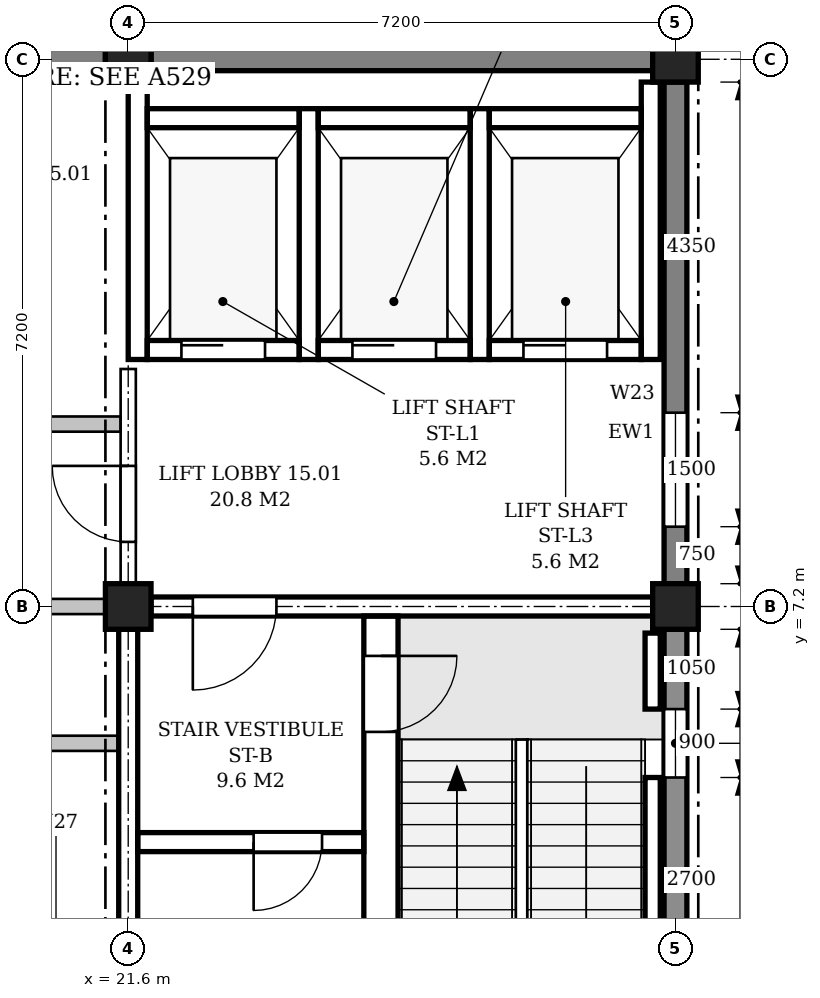
"""IFC4 building model, lengths in metres.
Left out: names, types, materials, properties, quantities, classifications, styles, units other than length and angle.
Written with IfcOpenShell. Run it as: python <this file> out.ifc"""

import sys

from ifc_helpers import new_model, si_unit, direction, frame, frame_2d, origin, origin_2d, place, context, subcontext, project, spatial, polyline, rectangle, outline, extrude, element, fill, save


model = new_model("IFC4")
c1 = context("Model", 3, precision=1e-05, world=origin(), true_north=direction((0.0, 1.0)))
c2 = subcontext(c1, "Body", "Model", "MODEL_VIEW")
j1 = project(units=[si_unit("LENGTHUNIT", "METRE"), si_unit("PLANEANGLEUNIT", "RADIAN")], contexts=[c1])
p1 = place(None, origin())
s1 = spatial("IfcSite", under=j1, at=p1, CompositionType="ELEMENT")
p2 = place(p1, origin())
s2 = spatial("IfcBuilding", under=s1, at=p2, CompositionType="ELEMENT")
p3 = place(p2, frame((0.0, 0.0, 72.3)))
s3 = spatial("IfcBuildingStorey", under=s2, at=p3, CompositionType="ELEMENT", Elevation=72.3)
for number, where, z_axis, x_axis in (
    (1, (21.6, 7.2, 0.0), (0.0, 0.0, 1.0), (1.0, 0.0, 0.0)),
    (2, (21.6, 14.4, 0.0), (0.0, 0.0, 1.0), (1.0, 0.0, 0.0)),
    (3, (28.8, 7.2, 0.0), (0.0, 0.0, 1.0), (1.0, 0.0, 0.0)),
    (4, (28.8, 14.4, 0.0), (0.0, 0.0, 1.0), (1.0, 0.0, 0.0)),
):
    element("IfcColumn", number, at=place(p3, frame(where, z_axis=z_axis, x_axis=x_axis)), inside=s3, PredefinedType="COLUMN", context=c2, shape_type="SweptSolid", body=[
        extrude(rectangle(XDim=0.6, YDim=0.6, at=origin_2d()), origin(), (0.0, 0.0, 1.0), 4.5),
    ])
p4 = place(p3, frame((28.8, 0.3, 0.0), z_axis=(0.0, 0.0, 1.0), x_axis=(0.0, 1.0, 0.0)))
e5 = element("IfcWall", 5, at=p4, inside=s3, PredefinedType="STANDARD", context=c2, shape_type="SweptSolid", body=[
    extrude(rectangle(XDim=6.6, YDim=0.3, at=frame_2d((3.3, 0.0))), origin(), (0.0, 0.0, 1.0), 3.65),
])
p5 = place(p4, frame((1.05, 0.0, 0.9)))
e6 = element("IfcOpeningElement", 6, at=p5, cuts=e5, PredefinedType="OPENING", context=c2, shape_type="SweptSolid", body=[
    extrude(outline(polyline([(0.0, 0.0), (0.9, 0.0), (0.9, 2.25), (0.45, 2.7), (0.0, 2.25), (0.0, 0.0)])), frame((0.0, 0.16, 0.0), z_axis=(0.0, -1.0, 0.0), x_axis=(1.0, 0.0, 0.0)), (0.0, 0.0, 1.0), 0.32),
])
p6 = place(p4, frame((4.65, 0.0, 0.9)))
e7 = element("IfcOpeningElement", 7, at=p6, cuts=e5, PredefinedType="OPENING", context=c2, shape_type="SweptSolid", body=[
    extrude(outline(polyline([(0.0, 0.0), (0.9, 0.0), (0.9, 2.25), (0.45, 2.7), (0.0, 2.25), (0.0, 0.0)])), frame((0.0, 0.16, 0.0), z_axis=(0.0, -1.0, 0.0), x_axis=(1.0, 0.0, 0.0)), (0.0, 0.0, 1.0), 0.32),
])
p7 = place(p3, frame((28.8, 7.5, 0.0), z_axis=(0.0, 0.0, 1.0), x_axis=(0.0, 1.0, 0.0)))
e8 = element("IfcWall", 8, at=p7, inside=s3, PredefinedType="STANDARD", context=c2, shape_type="SweptSolid", body=[
    extrude(rectangle(XDim=6.6, YDim=0.3, at=frame_2d((3.3, 0.0))), origin(), (0.0, 0.0, 1.0), 3.65),
])
p8 = place(p7, frame((0.75, 0.0, 0.9)))
e9 = element("IfcOpeningElement", 9, at=p8, cuts=e8, PredefinedType="OPENING", context=c2, shape_type="SweptSolid", body=[
    extrude(outline(polyline([(0.0, 0.0), (1.5, 0.0), (1.5, 1.95), (0.75, 2.7), (0.0, 1.95), (0.0, 0.0)])), frame((0.0, 0.16, 0.0), z_axis=(0.0, -1.0, 0.0), x_axis=(1.0, 0.0, 0.0)), (0.0, 0.0, 1.0), 0.32),
])
p9 = place(p3, frame((28.5, 14.4, 0.0), z_axis=(0.0, 0.0, 1.0), x_axis=(-1.0, 0.0, 0.0)))
e10 = element("IfcWall", 10, at=p9, inside=s3, PredefinedType="STANDARD", context=c2, shape_type="SweptSolid", body=[
    extrude(rectangle(XDim=6.6, YDim=0.3, at=frame_2d((3.3, 0.0))), origin(), (0.0, 0.0, 1.0), 3.65),
])
p10 = place(p3, frame((21.3, 14.4, 0.0), z_axis=(0.0, 0.0, 1.0), x_axis=(-1.0, 0.0, 0.0)))
e11 = element("IfcWall", 11, at=p10, inside=s3, PredefinedType="STANDARD", context=c2, shape_type="SweptSolid", body=[
    extrude(rectangle(XDim=6.6, YDim=0.3, at=frame_2d((3.3, 0.0))), origin(), (0.0, 0.0, 1.0), 3.65),
])
p11 = place(p10, frame((0.75, 0.0, 0.9)))
e12 = element("IfcOpeningElement", 12, at=p11, cuts=e11, PredefinedType="OPENING", context=c2, shape_type="SweptSolid", body=[
    extrude(outline(polyline([(0.0, 0.0), (1.5, 0.0), (1.5, 1.95), (0.75, 2.7), (0.0, 1.95), (0.0, 0.0)])), frame((0.0, 0.16, 0.0), z_axis=(0.0, -1.0, 0.0), x_axis=(1.0, 0.0, 0.0)), (0.0, 0.0, 1.0), 0.32),
])
p12 = place(p10, frame((4.35, 0.0, 0.9)))
e13 = element("IfcOpeningElement", 13, at=p12, cuts=e11, PredefinedType="OPENING", context=c2, shape_type="SweptSolid", body=[
    extrude(outline(polyline([(0.0, 0.0), (1.5, 0.0), (1.5, 1.95), (0.75, 2.7), (0.0, 1.95), (0.0, 0.0)])), frame((0.0, 0.16, 0.0), z_axis=(0.0, -1.0, 0.0), x_axis=(1.0, 0.0, 0.0)), (0.0, 0.0, 1.0), 0.32),
])
p13 = place(p3, frame((21.9, 7.2, 0.0), z_axis=(0.0, 0.0, 1.0), x_axis=(1.0, 0.0, 0.0)))
e14 = element("IfcWall", 14, at=p13, inside=s3, PredefinedType="SHEAR", context=c2, shape_type="SweptSolid", body=[
    extrude(rectangle(XDim=6.6, YDim=0.25, at=frame_2d((3.3, 0.0))), origin(), (0.0, 0.0, 1.0), 3.6),
])
p14 = place(p13, frame((0.55, 0.0, 0.0)))
e15 = element("IfcOpeningElement", 15, at=p14, cuts=e14, PredefinedType="OPENING", context=c2, shape_type="SweptSolid", body=[
    extrude(rectangle(XDim=1.1, YDim=2.1, at=frame_2d((0.55, 1.05))), frame((0.0, 0.135, 0.0), z_axis=(0.0, -1.0, 0.0), x_axis=(1.0, 0.0, 0.0)), (0.0, 0.0, 1.0), 0.27),
])
p15 = place(p3, frame((21.6, 0.3, 0.0), z_axis=(0.0, 0.0, 1.0), x_axis=(0.0, 1.0, 0.0)))
e16 = element("IfcWall", 16, at=p15, inside=s3, PredefinedType="SHEAR", context=c2, shape_type="SweptSolid", body=[
    extrude(rectangle(XDim=6.6, YDim=0.25, at=frame_2d((3.3, 0.0))), origin(), (0.0, 0.0, 1.0), 3.6),
])
p16 = place(p3, frame((28.5, 2.25, -0.25), z_axis=(0.0, 0.0, 1.0), x_axis=(0.0, 1.0, 0.0)))
e17 = element("IfcWall", 17, at=p16, inside=s3, PredefinedType="SHEAR", context=c2, shape_type="SweptSolid", body=[
    extrude(rectangle(XDim=2.7, YDim=0.2, at=frame_2d((1.35, 0.0))), origin(), (0.0, 0.0, 1.0), 4.5),
])
p17 = place(p3, frame((28.5, 5.85, -0.25), z_axis=(0.0, 0.0, 1.0), x_axis=(0.0, 1.0, 0.0)))
e18 = element("IfcWall", 18, at=p17, inside=s3, PredefinedType="SHEAR", context=c2, shape_type="SweptSolid", body=[
    extrude(rectangle(XDim=1.0, YDim=0.2, at=frame_2d((0.5, 0.0))), origin(), (0.0, 0.0, 1.0), 4.5),
])
p18 = place(p3, frame((24.925, 0.15, 0.0), z_axis=(0.0, 0.0, 1.0), x_axis=(0.0, 1.0, 0.0)))
e19 = element("IfcWall", 19, at=p18, inside=s3, PredefinedType="SHEAR", context=c2, shape_type="SweptSolid", body=[
    extrude(rectangle(XDim=6.925, YDim=0.45, at=frame_2d((3.462, 0.0))), origin(), (0.0, 0.0, 1.0), 4.25),
])
p19 = place(p18, frame((5.4, 0.0, 0.0)))
e20 = element("IfcOpeningElement", 20, at=p19, cuts=e19, PredefinedType="OPENING", context=c2, shape_type="SweptSolid", body=[
    extrude(rectangle(XDim=1.0, YDim=2.1, at=frame_2d((0.5, 1.05))), frame((0.0, 0.235, 0.0), z_axis=(0.0, -1.0, 0.0), x_axis=(1.0, 0.0, 0.0)), (0.0, 0.0, 1.0), 0.47),
])
p20 = place(p3, frame((21.725, 4.1, 0.0), z_axis=(0.0, 0.0, 1.0), x_axis=(1.0, 0.0, 0.0)))
e21 = element("IfcWall", 21, at=p20, inside=s3, PredefinedType="SHEAR", context=c2, shape_type="SweptSolid", body=[
    extrude(rectangle(XDim=2.975, YDim=0.25, at=frame_2d((1.487, 0.0))), origin(), (0.0, 0.0, 1.0), 4.25),
])
p21 = place(p20, frame((1.525, 0.0, 0.0)))
e22 = element("IfcOpeningElement", 22, at=p21, cuts=e21, PredefinedType="OPENING", context=c2, shape_type="SweptSolid", body=[
    extrude(rectangle(XDim=0.9, YDim=2.1, at=frame_2d((0.45, 1.05))), frame((0.0, 0.135, 0.0), z_axis=(0.0, -1.0, 0.0), x_axis=(1.0, 0.0, 0.0)), (0.0, 0.0, 1.0), 0.27),
])
p22 = place(p3, frame((21.725, 10.45, -0.25), z_axis=(0.0, 0.0, 1.0), x_axis=(0.0, 1.0, 0.0)))
e23 = element("IfcWall", 23, at=p22, inside=s3, PredefinedType="SHEAR", context=c2, shape_type="SweptSolid", body=[
    extrude(rectangle(XDim=3.65, YDim=0.25, at=frame_2d((1.825, 0.0))), origin(), (0.0, 0.0, 1.0), 3.85),
])
for number, where, z_axis, x_axis in (
    (24, (23.975, 10.45, -0.25), (0.0, 0.0, 1.0), (0.0, 1.0, 0.0)),
    (25, (26.225, 10.45, -0.25), (0.0, 0.0, 1.0), (0.0, 1.0, 0.0)),
):
    element("IfcWall", number, at=place(p3, frame(where, z_axis=z_axis, x_axis=x_axis)), inside=s3, PredefinedType="SHEAR", context=c2, shape_type="SweptSolid", body=[
        extrude(rectangle(XDim=3.3, YDim=0.25, at=frame_2d((1.65, 0.0))), origin(), (0.0, 0.0, 1.0), 4.5),
    ])
p23 = place(p3, frame((28.475, 10.45, -0.25), z_axis=(0.0, 0.0, 1.0), x_axis=(0.0, 1.0, 0.0)))
e26 = element("IfcWall", 26, at=p23, inside=s3, PredefinedType="SHEAR", context=c2, shape_type="SweptSolid", body=[
    extrude(rectangle(XDim=3.65, YDim=0.25, at=frame_2d((1.825, 0.0))), origin(), (0.0, 0.0, 1.0), 4.5),
])
p24 = place(p3, frame((21.85, 10.575, -0.25), z_axis=(0.0, 0.0, 1.0), x_axis=(1.0, 0.0, 0.0)))
e27 = element("IfcWall", 27, at=p24, inside=s3, PredefinedType="SHEAR", context=c2, shape_type="SweptSolid", body=[
    extrude(rectangle(XDim=2.0, YDim=0.25, at=frame_2d((1.0, 0.0))), origin(), (0.0, 0.0, 1.0), 4.5),
])
p25 = place(p24, frame((0.45, 0.0, 0.25)))
e28 = element("IfcOpeningElement", 28, at=p25, cuts=e27, PredefinedType="OPENING", context=c2, shape_type="SweptSolid", body=[
    extrude(rectangle(XDim=1.1, YDim=2.1, at=frame_2d((0.55, 1.05))), frame((0.0, 0.135, 0.0), z_axis=(0.0, -1.0, 0.0), x_axis=(1.0, 0.0, 0.0)), (0.0, 0.0, 1.0), 0.27),
])
p26 = place(p3, frame((21.85, 13.625, -0.25), z_axis=(0.0, 0.0, 1.0), x_axis=(1.0, 0.0, 0.0)))
e29 = element("IfcWall", 29, at=p26, inside=s3, PredefinedType="SHEAR", context=c2, shape_type="SweptSolid", body=[
    extrude(rectangle(XDim=2.0, YDim=0.25, at=frame_2d((1.0, 0.0))), origin(), (0.0, 0.0, 1.0), 4.5),
])
p27 = place(p3, frame((24.1, 10.575, -0.25), z_axis=(0.0, 0.0, 1.0), x_axis=(1.0, 0.0, 0.0)))
e30 = element("IfcWall", 30, at=p27, inside=s3, PredefinedType="SHEAR", context=c2, shape_type="SweptSolid", body=[
    extrude(rectangle(XDim=2.0, YDim=0.25, at=frame_2d((1.0, 0.0))), origin(), (0.0, 0.0, 1.0), 4.5),
])
p28 = place(p27, frame((0.45, 0.0, 0.25)))
e31 = element("IfcOpeningElement", 31, at=p28, cuts=e30, PredefinedType="OPENING", context=c2, shape_type="SweptSolid", body=[
    extrude(rectangle(XDim=1.1, YDim=2.1, at=frame_2d((0.55, 1.05))), frame((0.0, 0.135, 0.0), z_axis=(0.0, -1.0, 0.0), x_axis=(1.0, 0.0, 0.0)), (0.0, 0.0, 1.0), 0.27),
])
p29 = place(p3, frame((24.1, 13.625, -0.25), z_axis=(0.0, 0.0, 1.0), x_axis=(1.0, 0.0, 0.0)))
e32 = element("IfcWall", 32, at=p29, inside=s3, PredefinedType="SHEAR", context=c2, shape_type="SweptSolid", body=[
    extrude(rectangle(XDim=2.0, YDim=0.25, at=frame_2d((1.0, 0.0))), origin(), (0.0, 0.0, 1.0), 4.5),
])
p30 = place(p3, frame((26.35, 10.575, -0.25), z_axis=(0.0, 0.0, 1.0), x_axis=(1.0, 0.0, 0.0)))
e33 = element("IfcWall", 33, at=p30, inside=s3, PredefinedType="SHEAR", context=c2, shape_type="SweptSolid", body=[
    extrude(rectangle(XDim=2.0, YDim=0.25, at=frame_2d((1.0, 0.0))), origin(), (0.0, 0.0, 1.0), 4.5),
])
p31 = place(p30, frame((0.45, 0.0, 0.25)))
e34 = element("IfcOpeningElement", 34, at=p31, cuts=e33, PredefinedType="OPENING", context=c2, shape_type="SweptSolid", body=[
    extrude(rectangle(XDim=1.1, YDim=2.1, at=frame_2d((0.55, 1.05))), frame((0.0, 0.135, 0.0), z_axis=(0.0, -1.0, 0.0), x_axis=(1.0, 0.0, 0.0)), (0.0, 0.0, 1.0), 0.27),
])
p32 = place(p3, frame((26.35, 13.625, -0.25), z_axis=(0.0, 0.0, 1.0), x_axis=(1.0, 0.0, 0.0)))
e35 = element("IfcWall", 35, at=p32, inside=s3, PredefinedType="SHEAR", context=c2, shape_type="SweptSolid", body=[
    extrude(rectangle(XDim=2.0, YDim=0.25, at=frame_2d((1.0, 0.0))), origin(), (0.0, 0.0, 1.0), 4.5),
])
p33 = place(p3, frame((7.325, 5.4, 0.0), z_axis=(0.0, 0.0, 1.0), x_axis=(1.0, 0.0, 0.0)))
e36 = element("IfcWall", 36, at=p33, inside=s3, PredefinedType="PARTITIONING", context=c2, shape_type="SweptSolid", body=[
    extrude(outline(polyline([(0.0, 0.0), (14.15, 0.0), (14.15, 3.6), (14.075, 3.6), (14.075, 4.25), (7.275, 4.25), (7.275, 3.6), (6.875, 3.6), (6.875, 4.25), (0.075, 4.25), (0.075, 3.6), (0.0, 3.6), (0.0, 0.0)])), frame((0.0, 0.1, 0.0), z_axis=(0.0, -1.0, 0.0), x_axis=(1.0, 0.0, 0.0)), (0.0, 0.0, 1.0), 0.2),
])
p34 = place(p33, frame((1.238, 0.0, 0.0)))
e37 = element("IfcOpeningElement", 37, at=p34, cuts=e36, PredefinedType="OPENING", context=c2, shape_type="SweptSolid", body=[
    extrude(rectangle(XDim=1.0, YDim=2.1, at=frame_2d((0.5, 1.05))), frame((0.0, 0.11, 0.0), z_axis=(0.0, -1.0, 0.0), x_axis=(1.0, 0.0, 0.0)), (0.0, 0.0, 1.0), 0.22),
])
p35 = place(p33, frame((4.775, 0.0, 0.0)))
e38 = element("IfcOpeningElement", 38, at=p35, cuts=e36, PredefinedType="OPENING", context=c2, shape_type="SweptSolid", body=[
    extrude(rectangle(XDim=1.0, YDim=2.1, at=frame_2d((0.5, 1.05))), frame((0.0, 0.11, 0.0), z_axis=(0.0, -1.0, 0.0), x_axis=(1.0, 0.0, 0.0)), (0.0, 0.0, 1.0), 0.22),
])
p36 = place(p33, frame((8.375, 0.0, 0.0)))
e39 = element("IfcOpeningElement", 39, at=p36, cuts=e36, PredefinedType="OPENING", context=c2, shape_type="SweptSolid", body=[
    extrude(rectangle(XDim=1.0, YDim=2.1, at=frame_2d((0.5, 1.05))), frame((0.0, 0.11, 0.0), z_axis=(0.0, -1.0, 0.0), x_axis=(1.0, 0.0, 0.0)), (0.0, 0.0, 1.0), 0.22),
])
p37 = place(p33, frame((11.913, 0.0, 0.0)))
e40 = element("IfcOpeningElement", 40, at=p37, cuts=e36, PredefinedType="OPENING", context=c2, shape_type="SweptSolid", body=[
    extrude(rectangle(XDim=1.0, YDim=2.1, at=frame_2d((0.5, 1.05))), frame((0.0, 0.11, 0.0), z_axis=(0.0, -1.0, 0.0), x_axis=(1.0, 0.0, 0.0)), (0.0, 0.0, 1.0), 0.22),
])
p38 = place(p3, frame((14.7, 7.2, 0.0), z_axis=(0.0, 0.0, 1.0), x_axis=(1.0, 0.0, 0.0)))
e41 = element("IfcWall", 41, at=p38, inside=s3, PredefinedType="PARTITIONING", context=c2, shape_type="SweptSolid", body=[
    extrude(rectangle(XDim=6.6, YDim=0.2, at=frame_2d((3.3, 0.0))), origin(), (0.0, 0.0, 1.0), 3.6),
])
p39 = place(p38, frame((4.45, 0.0, 0.0)))
e42 = element("IfcOpeningElement", 42, at=p39, cuts=e41, PredefinedType="OPENING", context=c2, shape_type="SweptSolid", body=[
    extrude(rectangle(XDim=1.0, YDim=2.1, at=frame_2d((0.5, 1.05))), frame((0.0, 0.11, 0.0), z_axis=(0.0, -1.0, 0.0), x_axis=(1.0, 0.0, 0.0)), (0.0, 0.0, 1.0), 0.22),
])
p40 = place(p3, frame((3.5, 9.6, 0.0), z_axis=(0.0, 0.0, 1.0), x_axis=(1.0, 0.0, 0.0)))
e43 = element("IfcWall", 43, at=p40, inside=s3, PredefinedType="PARTITIONING", context=c2, shape_type="SweptSolid", body=[
    extrude(outline(polyline([(0.0, 0.0), (18.0, 0.0), (18.0, 3.6), (17.9, 3.6), (17.9, 4.25), (11.1, 4.25), (11.1, 3.6), (10.7, 3.6), (10.7, 4.25), (3.9, 4.25), (3.9, 3.6), (3.5, 3.6), (3.5, 4.25), (0.0, 4.25), (0.0, 0.0)])), frame((0.0, 0.1, 0.0), z_axis=(0.0, -1.0, 0.0), x_axis=(1.0, 0.0, 0.0)), (0.0, 0.0, 1.0), 0.2),
])
p41 = place(p40, frame((15.75, 0.0, 0.0)))
e44 = element("IfcOpeningElement", 44, at=p41, cuts=e43, PredefinedType="OPENING", context=c2, shape_type="SweptSolid", body=[
    extrude(rectangle(XDim=1.0, YDim=2.1, at=frame_2d((0.5, 1.05))), frame((0.0, 0.11, 0.0), z_axis=(0.0, -1.0, 0.0), x_axis=(1.0, 0.0, 0.0)), (0.0, 0.0, 1.0), 0.22),
])
p42 = place(p40, frame((4.5, 0.0, 0.0)))
e45 = element("IfcOpeningElement", 45, at=p42, cuts=e43, PredefinedType="OPENING", context=c2, shape_type="SweptSolid", body=[
    extrude(rectangle(XDim=2.0, YDim=2.1, at=frame_2d((1.0, 1.05))), frame((0.0, 0.11, 0.0), z_axis=(0.0, -1.0, 0.0), x_axis=(1.0, 0.0, 0.0)), (0.0, 0.0, 1.0), 0.22),
])
p43 = place(p40, frame((11.7, 0.0, 0.0)))
e46 = element("IfcOpeningElement", 46, at=p43, cuts=e43, PredefinedType="OPENING", context=c2, shape_type="SweptSolid", body=[
    extrude(rectangle(XDim=2.0, YDim=2.1, at=frame_2d((1.0, 1.05))), frame((0.0, 0.11, 0.0), z_axis=(0.0, -1.0, 0.0), x_axis=(1.0, 0.0, 0.0)), (0.0, 0.0, 1.0), 0.22),
])
p44 = place(p3, frame((21.6, 7.5, 0.0), z_axis=(0.0, 0.0, 1.0), x_axis=(0.0, 1.0, 0.0)))
e47 = element("IfcWall", 47, at=p44, inside=s3, PredefinedType="PARTITIONING", context=c2, shape_type="SweptSolid", body=[
    extrude(rectangle(XDim=2.825, YDim=0.2, at=frame_2d((1.413, 0.0))), origin(), (0.0, 0.0, 1.0), 3.6),
])
p45 = place(p44, frame((0.55, 0.0, 0.0)))
e48 = element("IfcOpeningElement", 48, at=p45, cuts=e47, PredefinedType="OPENING", context=c2, shape_type="SweptSolid", body=[
    extrude(rectangle(XDim=1.0, YDim=2.1, at=frame_2d((0.5, 1.05))), frame((0.0, 0.11, 0.0), z_axis=(0.0, -1.0, 0.0), x_axis=(1.0, 0.0, 0.0)), (0.0, 0.0, 1.0), 0.22),
])
p46 = place(p6, origin())
e49 = element("IfcWindow", 49, at=p46, inside=s3, PartitioningType="SINGLE_PANEL", PredefinedType="WINDOW", context=c2, shape_type="SweptSolid", body=[
    extrude(outline(polyline([(0.0, 0.0), (0.9, 0.0), (0.9, 2.25), (0.45, 2.7), (0.0, 2.25), (0.0, 0.0)])), frame((0.0, 0.03, 0.0), z_axis=(0.0, -1.0, 0.0), x_axis=(1.0, 0.0, 0.0)), (0.0, 0.0, 1.0), 0.06),
])
fill(e7, e49)
p47 = place(p8, origin())
e50 = element("IfcWindow", 50, at=p47, inside=s3, PartitioningType="SINGLE_PANEL", PredefinedType="WINDOW", context=c2, shape_type="SweptSolid", body=[
    extrude(outline(polyline([(0.0, 0.0), (1.5, 0.0), (1.5, 1.95), (0.75, 2.7), (0.0, 1.95), (0.0, 0.0)])), frame((0.0, 0.03, 0.0), z_axis=(0.0, -1.0, 0.0), x_axis=(1.0, 0.0, 0.0)), (0.0, 0.0, 1.0), 0.06),
])
fill(e9, e50)
p48 = place(p19, frame((1.0, 0.0, 0.0), z_axis=(0.0, 0.0, 1.0), x_axis=(-1.0, 0.0, 0.0)))
e51 = element("IfcDoor", 51, at=p48, inside=s3, OperationType="SINGLE_SWING_LEFT", PredefinedType="DOOR", context=c2, shape_type="SweptSolid", body=[
    extrude(rectangle(XDim=1.0, YDim=2.1, at=frame_2d((0.5, 1.05))), frame((0.0, 0.025, 0.0), z_axis=(0.0, -1.0, 0.0), x_axis=(1.0, 0.0, 0.0)), (0.0, 0.0, 1.0), 0.05),
])
fill(e20, e51)
p49 = place(p14, frame((1.1, 0.0, 0.0), z_axis=(0.0, 0.0, 1.0), x_axis=(-1.0, 0.0, 0.0)))
e52 = element("IfcDoor", 52, at=p49, inside=s3, OperationType="SINGLE_SWING_RIGHT", PredefinedType="DOOR", context=c2, shape_type="SweptSolid", body=[
    extrude(rectangle(XDim=1.1, YDim=2.1, at=frame_2d((0.55, 1.05))), frame((0.0, 0.025, 0.0), z_axis=(0.0, -1.0, 0.0), x_axis=(1.0, 0.0, 0.0)), (0.0, 0.0, 1.0), 0.05),
])
fill(e15, e52)
p50 = place(p21, frame((0.9, 0.0, 0.0), z_axis=(0.0, 0.0, 1.0), x_axis=(-1.0, 0.0, 0.0)))
e53 = element("IfcDoor", 53, at=p50, inside=s3, OperationType="SINGLE_SWING_RIGHT", PredefinedType="DOOR", context=c2, shape_type="SweptSolid", body=[
    extrude(rectangle(XDim=0.9, YDim=2.1, at=frame_2d((0.45, 1.05))), frame((0.0, 0.025, 0.0), z_axis=(0.0, -1.0, 0.0), x_axis=(1.0, 0.0, 0.0)), (0.0, 0.0, 1.0), 0.05),
])
fill(e22, e53)
p51 = place(p25, origin())
e54 = element("IfcDoor", 54, at=p51, inside=s3, OperationType="SLIDING_TO_LEFT", PredefinedType="DOOR", context=c2, shape_type="SweptSolid", body=[
    extrude(rectangle(XDim=1.1, YDim=2.1, at=frame_2d((0.55, 1.05))), frame((0.0, 0.025, 0.0), z_axis=(0.0, -1.0, 0.0), x_axis=(1.0, 0.0, 0.0)), (0.0, 0.0, 1.0), 0.05),
])
fill(e28, e54)
p52 = place(p28, origin())
e55 = element("IfcDoor", 55, at=p52, inside=s3, OperationType="SLIDING_TO_LEFT", PredefinedType="DOOR", context=c2, shape_type="SweptSolid", body=[
    extrude(rectangle(XDim=1.1, YDim=2.1, at=frame_2d((0.55, 1.05))), frame((0.0, 0.025, 0.0), z_axis=(0.0, -1.0, 0.0), x_axis=(1.0, 0.0, 0.0)), (0.0, 0.0, 1.0), 0.05),
])
fill(e31, e55)
p53 = place(p31, origin())
e56 = element("IfcDoor", 56, at=p53, inside=s3, OperationType="SLIDING_TO_LEFT", PredefinedType="DOOR", context=c2, shape_type="SweptSolid", body=[
    extrude(rectangle(XDim=1.1, YDim=2.1, at=frame_2d((0.55, 1.05))), frame((0.0, 0.025, 0.0), z_axis=(0.0, -1.0, 0.0), x_axis=(1.0, 0.0, 0.0)), (0.0, 0.0, 1.0), 0.05),
])
fill(e34, e56)
p54 = place(p45, origin())
e57 = element("IfcDoor", 57, at=p54, inside=s3, OperationType="SINGLE_SWING_RIGHT", PredefinedType="DOOR", context=c2, shape_type="SweptSolid", body=[
    extrude(rectangle(XDim=1.0, YDim=2.1, at=frame_2d((0.5, 1.05))), frame((0.0, 0.025, 0.0), z_axis=(0.0, -1.0, 0.0), x_axis=(1.0, 0.0, 0.0)), (0.0, 0.0, 1.0), 0.05),
])
fill(e48, e57)
save(model, sys.argv[1])
